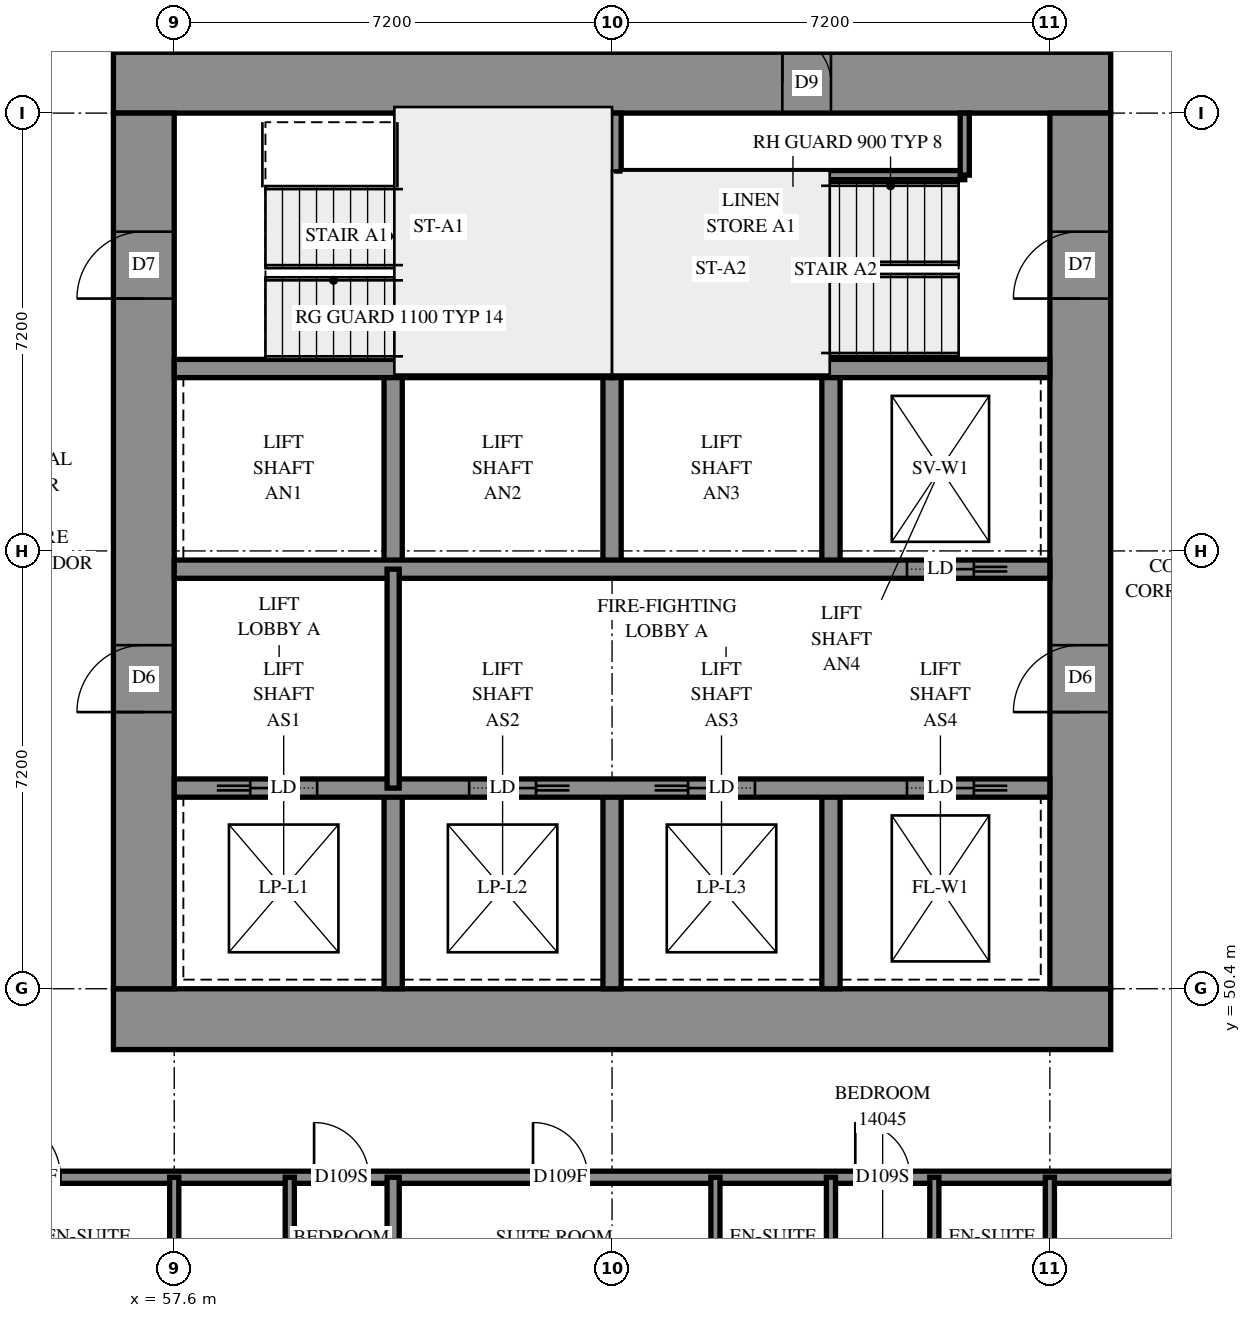
"""IFC4 building model, lengths in metres.
Left out: names, types, materials, properties, quantities, classifications, styles, units other than length and angle.
Written with IfcOpenShell. Run it as: python <this file> out.ifc"""

import sys

from ifc_helpers import new_model, si_unit, direction, frame, frame_2d, origin, place, context, subcontext, project, spatial, rectangle, extrude, element, fill, save


model = new_model("IFC4")
c1 = context("Model", 3, precision=1e-05, world=origin(), true_north=direction((0.0, 1.0)))
c2 = subcontext(c1, "Body", "Model", "MODEL_VIEW")
j1 = project(units=[si_unit("LENGTHUNIT", "METRE"), si_unit("PLANEANGLEUNIT", "RADIAN")], contexts=[c1])
p1 = place(None, origin())
s1 = spatial("IfcSite", under=j1, at=p1, CompositionType="ELEMENT")
p2 = place(p1, origin())
s2 = spatial("IfcBuilding", under=s1, at=p2, CompositionType="ELEMENT")
p3 = place(p2, frame((0.0, 0.0, 54.2)))
s3 = spatial("IfcBuildingStorey", under=s2, at=p3, CompositionType="ELEMENT", Elevation=54.2)
p4 = place(p3, frame((56.6, 49.9, -0.3), z_axis=(0.0, 0.0, 1.0), x_axis=(1.0, 0.0, 0.0)))
e1 = element("IfcWall", 1, at=p4, inside=s3, PredefinedType="SHEAR", context=c2, shape_type="SweptSolid", body=[
    extrude(rectangle(XDim=16.4, YDim=1.0, at=frame_2d((8.2, 0.0))), origin(), (0.0, 0.0, 1.0), 2.7),
])
p5 = place(p3, frame((56.6, 65.3, -0.3), z_axis=(0.0, 0.0, 1.0), x_axis=(1.0, 0.0, 0.0)))
e2 = element("IfcWall", 2, at=p5, inside=s3, PredefinedType="SHEAR", context=c2, shape_type="SweptSolid", body=[
    extrude(rectangle(XDim=16.4, YDim=1.0, at=frame_2d((8.2, 0.0))), origin(), (0.0, 0.0, 1.0), 2.7),
])
p6 = place(p5, frame((11.0, 0.0, 0.3)))
e3 = element("IfcOpeningElement", 3, at=p6, cuts=e2, PredefinedType="OPENING", context=c2, shape_type="SweptSolid", body=[
    extrude(rectangle(XDim=0.8, YDim=2.1, at=frame_2d((0.4, 1.05))), frame((0.0, 0.51, 0.0), z_axis=(0.0, -1.0, 0.0), x_axis=(1.0, 0.0, 0.0)), (0.0, 0.0, 1.0), 1.02),
])
p7 = place(p3, frame((57.1, 50.4, -0.3), z_axis=(0.0, 0.0, 1.0), x_axis=(0.0, 1.0, 0.0)))
e4 = element("IfcWall", 4, at=p7, inside=s3, PredefinedType="SHEAR", context=c2, shape_type="SweptSolid", body=[
    extrude(rectangle(XDim=14.4, YDim=1.0, at=frame_2d((7.2, 0.0))), origin(), (0.0, 0.0, 1.0), 2.7),
])
p8 = place(p7, frame((4.55, 0.0, 0.3)))
e5 = element("IfcOpeningElement", 5, at=p8, cuts=e4, PredefinedType="OPENING", context=c2, shape_type="SweptSolid", body=[
    extrude(rectangle(XDim=1.1, YDim=2.1, at=frame_2d((0.55, 1.05))), frame((0.0, 0.51, 0.0), z_axis=(0.0, -1.0, 0.0), x_axis=(1.0, 0.0, 0.0)), (0.0, 0.0, 1.0), 1.02),
])
p9 = place(p7, frame((11.35, 0.0, 0.3)))
e6 = element("IfcOpeningElement", 6, at=p9, cuts=e4, PredefinedType="OPENING", context=c2, shape_type="SweptSolid", body=[
    extrude(rectangle(XDim=1.1, YDim=2.1, at=frame_2d((0.55, 1.05))), frame((0.0, 0.51, 0.0), z_axis=(0.0, -1.0, 0.0), x_axis=(1.0, 0.0, 0.0)), (0.0, 0.0, 1.0), 1.02),
])
p10 = place(p3, frame((72.5, 50.4, -0.3), z_axis=(0.0, 0.0, 1.0), x_axis=(0.0, 1.0, 0.0)))
e7 = element("IfcWall", 7, at=p10, inside=s3, PredefinedType="SHEAR", context=c2, shape_type="SweptSolid", body=[
    extrude(rectangle(XDim=14.4, YDim=1.0, at=frame_2d((7.2, 0.0))), origin(), (0.0, 0.0, 1.0), 2.7),
])
p11 = place(p10, frame((4.55, 0.0, 0.3)))
e8 = element("IfcOpeningElement", 8, at=p11, cuts=e7, PredefinedType="OPENING", context=c2, shape_type="SweptSolid", body=[
    extrude(rectangle(XDim=1.1, YDim=2.1, at=frame_2d((0.55, 1.05))), frame((0.0, 0.51, 0.0), z_axis=(0.0, -1.0, 0.0), x_axis=(1.0, 0.0, 0.0)), (0.0, 0.0, 1.0), 1.02),
])
p12 = place(p10, frame((11.35, 0.0, 0.3)))
e9 = element("IfcOpeningElement", 9, at=p12, cuts=e7, PredefinedType="OPENING", context=c2, shape_type="SweptSolid", body=[
    extrude(rectangle(XDim=1.1, YDim=2.1, at=frame_2d((0.55, 1.05))), frame((0.0, 0.51, 0.0), z_axis=(0.0, -1.0, 0.0), x_axis=(1.0, 0.0, 0.0)), (0.0, 0.0, 1.0), 1.02),
])
for number, where, z_axis, x_axis in (
    (10, (61.2, 50.4, 0.0), (0.0, 0.0, 1.0), (0.0, 1.0, 0.0)),
    (11, (61.2, 57.3, 0.0), (0.0, 0.0, 1.0), (0.0, 1.0, 0.0)),
    (12, (64.8, 50.4, 0.0), (0.0, 0.0, 1.0), (0.0, 1.0, 0.0)),
    (13, (64.8, 57.3, 0.0), (0.0, 0.0, 1.0), (0.0, 1.0, 0.0)),
    (14, (68.4, 50.4, 0.0), (0.0, 0.0, 1.0), (0.0, 1.0, 0.0)),
    (15, (68.4, 57.3, 0.0), (0.0, 0.0, 1.0), (0.0, 1.0, 0.0)),
):
    element("IfcWall", number, at=place(p3, frame(where, z_axis=z_axis, x_axis=x_axis)), inside=s3, PredefinedType="SOLIDWALL", context=c2, shape_type="SweptSolid", body=[
        extrude(rectangle(XDim=3.3, YDim=0.3, at=frame_2d((1.65, 0.0))), origin(), (0.0, 0.0, 1.0), 3.1),
    ])
p13 = place(p3, frame((57.6, 53.7, 0.0), z_axis=(0.0, 0.0, 1.0), x_axis=(1.0, 0.0, 0.0)))
e16 = element("IfcWall", 16, at=p13, inside=s3, PredefinedType="SOLIDWALL", context=c2, shape_type="SweptSolid", body=[
    extrude(rectangle(XDim=14.4, YDim=0.3, at=frame_2d((7.2, 0.0))), origin(), (0.0, 0.0, 1.0), 3.1),
])
p14 = place(p13, frame((1.25, 0.0, 0.0)))
e17 = element("IfcOpeningElement", 17, at=p14, cuts=e16, PredefinedType="OPENING", context=c2, shape_type="SweptSolid", body=[
    extrude(rectangle(XDim=1.1, YDim=2.1, at=frame_2d((0.55, 1.05))), frame((0.0, 0.16, 0.0), z_axis=(0.0, -1.0, 0.0), x_axis=(1.0, 0.0, 0.0)), (0.0, 0.0, 1.0), 0.32),
])
p15 = place(p13, frame((4.85, 0.0, 0.0)))
e18 = element("IfcOpeningElement", 18, at=p15, cuts=e16, PredefinedType="OPENING", context=c2, shape_type="SweptSolid", body=[
    extrude(rectangle(XDim=1.1, YDim=2.1, at=frame_2d((0.55, 1.05))), frame((0.0, 0.16, 0.0), z_axis=(0.0, -1.0, 0.0), x_axis=(1.0, 0.0, 0.0)), (0.0, 0.0, 1.0), 0.32),
])
p16 = place(p13, frame((8.45, 0.0, 0.0)))
e19 = element("IfcOpeningElement", 19, at=p16, cuts=e16, PredefinedType="OPENING", context=c2, shape_type="SweptSolid", body=[
    extrude(rectangle(XDim=1.1, YDim=2.1, at=frame_2d((0.55, 1.05))), frame((0.0, 0.16, 0.0), z_axis=(0.0, -1.0, 0.0), x_axis=(1.0, 0.0, 0.0)), (0.0, 0.0, 1.0), 0.32),
])
p17 = place(p13, frame((12.05, 0.0, 0.0)))
e20 = element("IfcOpeningElement", 20, at=p17, cuts=e16, PredefinedType="OPENING", context=c2, shape_type="SweptSolid", body=[
    extrude(rectangle(XDim=1.1, YDim=2.1, at=frame_2d((0.55, 1.05))), frame((0.0, 0.16, 0.0), z_axis=(0.0, -1.0, 0.0), x_axis=(1.0, 0.0, 0.0)), (0.0, 0.0, 1.0), 0.32),
])
p18 = place(p3, frame((57.6, 57.3, 0.0), z_axis=(0.0, 0.0, 1.0), x_axis=(1.0, 0.0, 0.0)))
e21 = element("IfcWall", 21, at=p18, inside=s3, PredefinedType="SOLIDWALL", context=c2, shape_type="SweptSolid", body=[
    extrude(rectangle(XDim=14.4, YDim=0.3, at=frame_2d((7.2, 0.0))), origin(), (0.0, 0.0, 1.0), 3.1),
])
p19 = place(p18, frame((12.05, 0.0, 0.0)))
e22 = element("IfcOpeningElement", 22, at=p19, cuts=e21, PredefinedType="OPENING", context=c2, shape_type="SweptSolid", body=[
    extrude(rectangle(XDim=1.1, YDim=2.1, at=frame_2d((0.55, 1.05))), frame((0.0, 0.16, 0.0), z_axis=(0.0, -1.0, 0.0), x_axis=(1.0, 0.0, 0.0)), (0.0, 0.0, 1.0), 0.32),
])
for number, where, z_axis, x_axis in (
    (23, (57.6, 60.6, 0.0), (0.0, 0.0, 1.0), (1.0, 0.0, 0.0)),
    (24, (64.8, 60.6, 0.0), (0.0, 0.0, 1.0), (1.0, 0.0, 0.0)),
):
    element("IfcWall", number, at=place(p3, frame(where, z_axis=z_axis, x_axis=x_axis)), inside=s3, PredefinedType="SOLIDWALL", context=c2, shape_type="SweptSolid", body=[
        extrude(rectangle(XDim=7.2, YDim=0.3, at=frame_2d((3.6, 0.0))), origin(), (0.0, 0.0, 1.0), 3.1),
    ])
p20 = place(p3, frame((64.8, 60.6, 0.0), z_axis=(0.0, 0.0, 1.0), x_axis=(0.0, 1.0, 0.0)))
e25 = element("IfcWall", 25, at=p20, inside=s3, PredefinedType="SOLIDWALL", context=c2, shape_type="SweptSolid", body=[
    extrude(rectangle(XDim=4.2, YDim=0.3, at=frame_2d((2.1, 0.0))), origin(), (0.0, 0.0, 1.0), 3.1),
])
p21 = place(p3, frame((64.95, 63.78, 0.0), z_axis=(0.0, 0.0, 1.0), x_axis=(1.0, 0.0, 0.0)))
e26 = element("IfcWall", 26, at=p21, inside=s3, PredefinedType="PARTITIONING", context=c2, shape_type="SweptSolid", body=[
    extrude(rectangle(XDim=5.65, YDim=0.15, at=frame_2d((2.825, 0.0))), origin(), (0.0, 0.0, 1.0), 3.1),
])
p22 = place(p3, frame((70.6, 63.78, 0.0), z_axis=(0.0, 0.0, 1.0), x_axis=(0.0, 1.0, 0.0)))
e27 = element("IfcWall", 27, at=p22, inside=s3, PredefinedType="PARTITIONING", context=c2, shape_type="SweptSolid", body=[
    extrude(rectangle(XDim=1.02, YDim=0.15, at=frame_2d((0.51, 0.0))), origin(), (0.0, 0.0, 1.0), 3.1),
])
p23 = place(p3, frame((61.2, 53.7, 0.0), z_axis=(0.0, 0.0, 1.0), x_axis=(0.0, 1.0, 0.0)))
e28 = element("IfcWall", 28, at=p23, inside=s3, PredefinedType="PARTITIONING", context=c2, shape_type="SweptSolid", body=[
    extrude(rectangle(XDim=3.6, YDim=0.2, at=frame_2d((1.8, 0.0))), origin(), (0.0, 0.0, 1.0), 3.1),
])
p24 = place(p3, frame((54.5, 47.3, 0.0), z_axis=(0.0, 0.0, 1.0), x_axis=(1.0, 0.0, 0.0)))
e29 = element("IfcWall", 29, at=p24, inside=s3, PredefinedType="PARTITIONING", context=c2, shape_type="SweptSolid", body=[
    extrude(rectangle(XDim=19.56, YDim=0.2, at=frame_2d((9.78, 0.0))), origin(), (0.0, 0.0, 1.0), 3.1),
])
p25 = place(p24, frame((0.23, 0.0, 0.0)))
e30 = element("IfcOpeningElement", 30, at=p25, cuts=e29, PredefinedType="OPENING", context=c2, shape_type="SweptSolid", body=[
    extrude(rectangle(XDim=1.0, YDim=2.1, at=frame_2d((0.5, 1.05))), frame((0.0, 0.11, 0.0), z_axis=(0.0, -1.0, 0.0), x_axis=(1.0, 0.0, 0.0)), (0.0, 0.0, 1.0), 0.22),
])
p26 = place(p24, frame((5.4, 0.0, 0.0)))
e31 = element("IfcOpeningElement", 31, at=p26, cuts=e29, PredefinedType="OPENING", context=c2, shape_type="SweptSolid", body=[
    extrude(rectangle(XDim=0.9, YDim=2.1, at=frame_2d((0.45, 1.05))), frame((0.0, 0.11, 0.0), z_axis=(0.0, -1.0, 0.0), x_axis=(1.0, 0.0, 0.0)), (0.0, 0.0, 1.0), 0.22),
])
p27 = place(p24, frame((9.001, 0.0, 0.0)))
e32 = element("IfcOpeningElement", 32, at=p27, cuts=e29, PredefinedType="OPENING", context=c2, shape_type="SweptSolid", body=[
    extrude(rectangle(XDim=0.9, YDim=2.1, at=frame_2d((0.45, 1.05))), frame((0.0, 0.11, 0.0), z_axis=(0.0, -1.0, 0.0), x_axis=(1.0, 0.0, 0.0)), (0.0, 0.0, 1.0), 0.22),
])
p28 = place(p24, frame((14.3, 0.0, 0.0)))
e33 = element("IfcOpeningElement", 33, at=p28, cuts=e29, PredefinedType="OPENING", context=c2, shape_type="SweptSolid", body=[
    extrude(rectangle(XDim=0.9, YDim=2.1, at=frame_2d((0.45, 1.05))), frame((0.0, 0.11, 0.0), z_axis=(0.0, -1.0, 0.0), x_axis=(1.0, 0.0, 0.0)), (0.0, 0.0, 1.0), 0.22),
])
p29 = place(p3, frame((61.2, 42.276, 0.0), z_axis=(0.0, 0.0, 1.0), x_axis=(0.0, 1.0, 0.0)))
e34 = element("IfcWall", 34, at=p29, inside=s3, PredefinedType="PARTITIONING", context=c2, shape_type="SweptSolid", body=[
    extrude(rectangle(XDim=5.024, YDim=0.2, at=frame_2d((2.512, 0.0))), origin(), (0.0, 0.0, 1.0), 3.1),
])
p30 = place(p3, frame((74.057, 47.297, 0.0), z_axis=(0.0, 0.0, 1.0), x_axis=(0.7071067812, -0.7071067812, 0.0)))
e35 = element("IfcWall", 35, at=p30, inside=s3, PredefinedType="PARTITIONING", context=c2, shape_type="SweptSolid", body=[
    extrude(rectangle(XDim=4.653, YDim=0.2, at=frame_2d((2.326, 0.0))), origin(), (0.0, 0.0, 1.0), 3.1),
])
p31 = place(p30, frame((0.57, 0.0, 0.0)))
e36 = element("IfcOpeningElement", 36, at=p31, cuts=e35, PredefinedType="OPENING", context=c2, shape_type="SweptSolid", body=[
    extrude(rectangle(XDim=1.0, YDim=2.1, at=frame_2d((0.5, 1.05))), frame((0.0, 0.11, 0.0), z_axis=(0.0, -1.0, 0.0), x_axis=(1.0, 0.0, 0.0)), (0.0, 0.0, 1.0), 0.22),
])
for number, where, z_axis, x_axis in (
    (37, (59.5, 44.9, 0.0), (0.0, 0.0, 1.0), (0.0, 1.0, 0.0)),
    (38, (57.6, 44.9, 0.0), (0.0, 0.0, 1.0), (0.0, 1.0, 0.0)),
    (39, (66.5, 44.9, 0.0), (0.0, 0.0, 1.0), (0.0, 1.0, 0.0)),
    (40, (68.4, 44.9, 0.0), (0.0, 0.0, 1.0), (0.0, 1.0, 0.0)),
    (41, (70.1, 44.9, 0.0), (0.0, 0.0, 1.0), (0.0, 1.0, 0.0)),
    (42, (72.0, 44.9, 0.0), (0.0, 0.0, 1.0), (0.0, 1.0, 0.0)),
):
    element("IfcWall", number, at=place(p3, frame(where, z_axis=z_axis, x_axis=x_axis)), inside=s3, PredefinedType="PARTITIONING", context=c2, shape_type="SweptSolid", body=[
        extrude(rectangle(XDim=2.4, YDim=0.15, at=frame_2d((1.2, 0.0))), origin(), (0.0, 0.0, 1.0), 3.1),
    ])
p32 = place(p6, origin())
e43 = element("IfcDoor", 43, at=p32, inside=s3, OperationType="SINGLE_SWING_RIGHT", PredefinedType="DOOR", context=c2, shape_type="SweptSolid", body=[
    extrude(rectangle(XDim=0.8, YDim=2.1, at=frame_2d((0.4, 1.05))), frame((0.0, -0.44, 0.0), z_axis=(0.0, -1.0, 0.0), x_axis=(1.0, 0.0, 0.0)), (0.0, 0.0, 1.0), 0.05),
])
fill(e3, e43)
p33 = place(p8, origin())
e44 = element("IfcDoor", 44, at=p33, inside=s3, OperationType="DOUBLE_DOOR_SINGLE_SWING", PredefinedType="DOOR", context=c2, shape_type="SweptSolid", body=[
    extrude(rectangle(XDim=1.1, YDim=2.1, at=frame_2d((0.55, 1.05))), frame((0.0, 0.025, 0.0), z_axis=(0.0, -1.0, 0.0), x_axis=(1.0, 0.0, 0.0)), (0.0, 0.0, 1.0), 0.05),
])
fill(e5, e44)
p34 = place(p11, origin())
e45 = element("IfcDoor", 45, at=p34, inside=s3, OperationType="DOUBLE_DOOR_SINGLE_SWING", PredefinedType="DOOR", context=c2, shape_type="SweptSolid", body=[
    extrude(rectangle(XDim=1.1, YDim=2.1, at=frame_2d((0.55, 1.05))), frame((0.0, 0.025, 0.0), z_axis=(0.0, -1.0, 0.0), x_axis=(1.0, 0.0, 0.0)), (0.0, 0.0, 1.0), 0.05),
])
fill(e8, e45)
p35 = place(p9, origin())
e46 = element("IfcDoor", 46, at=p35, inside=s3, OperationType="SINGLE_SWING_LEFT", PredefinedType="DOOR", context=c2, shape_type="SweptSolid", body=[
    extrude(rectangle(XDim=1.1, YDim=2.1, at=frame_2d((0.55, 1.05))), frame((0.0, 0.025, 0.0), z_axis=(0.0, -1.0, 0.0), x_axis=(1.0, 0.0, 0.0)), (0.0, 0.0, 1.0), 0.05),
])
fill(e6, e46)
p36 = place(p12, origin())
e47 = element("IfcDoor", 47, at=p36, inside=s3, OperationType="SINGLE_SWING_RIGHT", PredefinedType="DOOR", context=c2, shape_type="SweptSolid", body=[
    extrude(rectangle(XDim=1.1, YDim=2.1, at=frame_2d((0.55, 1.05))), frame((0.0, 0.025, 0.0), z_axis=(0.0, -1.0, 0.0), x_axis=(1.0, 0.0, 0.0)), (0.0, 0.0, 1.0), 0.05),
])
fill(e9, e47)
p37 = place(p14, origin())
e48 = element("IfcDoor", 48, at=p37, inside=s3, OperationType="SLIDING_TO_LEFT", PredefinedType="DOOR", context=c2, shape_type="SweptSolid", body=[
    extrude(rectangle(XDim=1.1, YDim=2.1, at=frame_2d((0.55, 1.05))), frame((0.0, 0.025, 0.0), z_axis=(0.0, -1.0, 0.0), x_axis=(1.0, 0.0, 0.0)), (0.0, 0.0, 1.0), 0.05),
])
fill(e17, e48)
p38 = place(p15, origin())
e49 = element("IfcDoor", 49, at=p38, inside=s3, OperationType="SLIDING_TO_RIGHT", PredefinedType="DOOR", context=c2, shape_type="SweptSolid", body=[
    extrude(rectangle(XDim=1.1, YDim=2.1, at=frame_2d((0.55, 1.05))), frame((0.0, 0.025, 0.0), z_axis=(0.0, -1.0, 0.0), x_axis=(1.0, 0.0, 0.0)), (0.0, 0.0, 1.0), 0.05),
])
fill(e18, e49)
p39 = place(p16, origin())
e50 = element("IfcDoor", 50, at=p39, inside=s3, OperationType="SLIDING_TO_LEFT", PredefinedType="DOOR", context=c2, shape_type="SweptSolid", body=[
    extrude(rectangle(XDim=1.1, YDim=2.1, at=frame_2d((0.55, 1.05))), frame((0.0, 0.025, 0.0), z_axis=(0.0, -1.0, 0.0), x_axis=(1.0, 0.0, 0.0)), (0.0, 0.0, 1.0), 0.05),
])
fill(e19, e50)
p40 = place(p17, origin())
e51 = element("IfcDoor", 51, at=p40, inside=s3, OperationType="SLIDING_TO_RIGHT", PredefinedType="DOOR", context=c2, shape_type="SweptSolid", body=[
    extrude(rectangle(XDim=1.1, YDim=2.1, at=frame_2d((0.55, 1.05))), frame((0.0, 0.025, 0.0), z_axis=(0.0, -1.0, 0.0), x_axis=(1.0, 0.0, 0.0)), (0.0, 0.0, 1.0), 0.05),
])
fill(e20, e51)
p41 = place(p19, origin())
e52 = element("IfcDoor", 52, at=p41, inside=s3, OperationType="SLIDING_TO_RIGHT", PredefinedType="DOOR", context=c2, shape_type="SweptSolid", body=[
    extrude(rectangle(XDim=1.1, YDim=2.1, at=frame_2d((0.55, 1.05))), frame((0.0, 0.025, 0.0), z_axis=(0.0, -1.0, 0.0), x_axis=(1.0, 0.0, 0.0)), (0.0, 0.0, 1.0), 0.05),
])
fill(e22, e52)
p42 = place(p25, origin())
e53 = element("IfcDoor", 53, at=p42, inside=s3, OperationType="SINGLE_SWING_RIGHT", PredefinedType="DOOR", context=c2, shape_type="SweptSolid", body=[
    extrude(rectangle(XDim=1.0, YDim=2.1, at=frame_2d((0.5, 1.05))), frame((0.0, 0.025, 0.0), z_axis=(0.0, -1.0, 0.0), x_axis=(1.0, 0.0, 0.0)), (0.0, 0.0, 1.0), 0.05),
])
fill(e30, e53)
p43 = place(p26, origin())
e54 = element("IfcDoor", 54, at=p43, inside=s3, OperationType="SINGLE_SWING_LEFT", PredefinedType="DOOR", context=c2, shape_type="SweptSolid", body=[
    extrude(rectangle(XDim=0.9, YDim=2.1, at=frame_2d((0.45, 1.05))), frame((0.0, 0.025, 0.0), z_axis=(0.0, -1.0, 0.0), x_axis=(1.0, 0.0, 0.0)), (0.0, 0.0, 1.0), 0.05),
])
fill(e31, e54)
p44 = place(p27, origin())
e55 = element("IfcDoor", 55, at=p44, inside=s3, OperationType="SINGLE_SWING_RIGHT", PredefinedType="DOOR", context=c2, shape_type="SweptSolid", body=[
    extrude(rectangle(XDim=0.9, YDim=2.1, at=frame_2d((0.45, 1.05))), frame((0.0, 0.025, 0.0), z_axis=(0.0, -1.0, 0.0), x_axis=(1.0, 0.0, 0.0)), (0.0, 0.0, 1.0), 0.05),
])
fill(e32, e55)
p45 = place(p28, origin())
e56 = element("IfcDoor", 56, at=p45, inside=s3, OperationType="SINGLE_SWING_RIGHT", PredefinedType="DOOR", context=c2, shape_type="SweptSolid", body=[
    extrude(rectangle(XDim=0.9, YDim=2.1, at=frame_2d((0.45, 1.05))), frame((0.0, 0.025, 0.0), z_axis=(0.0, -1.0, 0.0), x_axis=(1.0, 0.0, 0.0)), (0.0, 0.0, 1.0), 0.05),
])
fill(e33, e56)
save(model, sys.argv[1])
